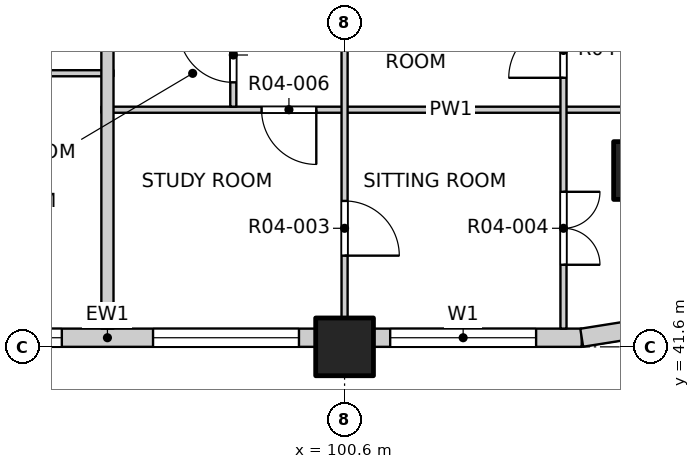
"""IFC4 building model, lengths in metres.
Left out: names, types, materials, properties, quantities, classifications, styles, units other than length and angle.
Written with IfcOpenShell. Run it as: python <this file> out.ifc"""

import sys

from ifc_helpers import new_model, si_unit, direction, frame, frame_2d, origin, origin_2d, place, context, subcontext, project, spatial, rectangle, extrude, element, fill, save


model = new_model("IFC4")
c1 = context("Model", 3, precision=1e-05, world=origin(), true_north=direction((0.0, 1.0)))
c2 = subcontext(c1, "Body", "Model", "MODEL_VIEW")
j1 = project(units=[si_unit("LENGTHUNIT", "METRE"), si_unit("PLANEANGLEUNIT", "RADIAN")], contexts=[c1])
p1 = place(None, origin())
s1 = spatial("IfcSite", under=j1, at=p1, CompositionType="ELEMENT")
p2 = place(p1, origin())
s2 = spatial("IfcBuilding", under=s1, at=p2, CompositionType="ELEMENT")
p3 = place(p2, frame((0.0, 0.0, 58.0)))
s3 = spatial("IfcBuildingStorey", under=s2, at=p3, CompositionType="ELEMENT", Elevation=58.0)
for number, where, z_axis, x_axis in (
    (1, (105.5, 44.5, -0.25), (0.0, 0.0, 1.0), (1.0, 0.0, 0.0)),
    (2, (100.6, 41.6, -0.25), (0.0, 0.0, 1.0), (1.0, 0.0, 0.0)),
):
    element("IfcColumn", number, at=place(p3, frame(where, z_axis=z_axis, x_axis=x_axis)), inside=s3, PredefinedType="COLUMN", context=c2, shape_type="SweptSolid", body=[
        extrude(rectangle(XDim=0.95, YDim=0.95, at=origin_2d()), origin(), (0.0, 0.0, 1.0), 3.4),
    ])
p4 = place(p3, frame((93.275, 41.75, 0.0), z_axis=(0.0, 0.0, 1.0), x_axis=(1.0, 0.0, 0.0)))
e3 = element("IfcWall", 3, at=p4, inside=s3, PredefinedType="SOLIDWALL", context=c2, shape_type="SweptSolid", body=[
    extrude(rectangle(XDim=6.85, YDim=0.3, at=frame_2d((3.425, 0.0))), origin(), (0.0, 0.0, 1.0), 2.7),
])
p5 = place(p4, frame((0.275, 0.0, 0.9)))
e4 = element("IfcOpeningElement", 4, at=p5, cuts=e3, PredefinedType="OPENING", context=c2, shape_type="SweptSolid", body=[
    extrude(rectangle(XDim=2.4, YDim=1.8, at=frame_2d((1.2, 0.9))), frame((0.0, 0.16, 0.0), z_axis=(0.0, -1.0, 0.0), x_axis=(1.0, 0.0, 0.0)), (0.0, 0.0, 1.0), 0.32),
])
p6 = place(p4, frame((4.175, 0.0, 0.9)))
e5 = element("IfcOpeningElement", 5, at=p6, cuts=e3, PredefinedType="OPENING", context=c2, shape_type="SweptSolid", body=[
    extrude(rectangle(XDim=2.4, YDim=1.8, at=frame_2d((1.2, 0.9))), frame((0.0, 0.16, 0.0), z_axis=(0.0, -1.0, 0.0), x_axis=(1.0, 0.0, 0.0)), (0.0, 0.0, 1.0), 0.32),
])
p7 = place(p3, frame((101.075, 41.75, 0.0), z_axis=(0.0, 0.0, 1.0), x_axis=(1.0, 0.0, 0.0)))
e6 = element("IfcWall", 6, at=p7, inside=s3, PredefinedType="SOLIDWALL", context=c2, shape_type="SweptSolid", body=[
    extrude(rectangle(XDim=3.425, YDim=0.3, at=frame_2d((1.712, 0.0))), origin(), (0.0, 0.0, 1.0), 2.7),
])
p8 = place(p7, frame((0.275, 0.0, 0.9)))
e7 = element("IfcOpeningElement", 7, at=p8, cuts=e6, PredefinedType="OPENING", context=c2, shape_type="SweptSolid", body=[
    extrude(rectangle(XDim=2.4, YDim=1.8, at=frame_2d((1.2, 0.9))), frame((0.0, 0.16, 0.0), z_axis=(0.0, -1.0, 0.0), x_axis=(1.0, 0.0, 0.0)), (0.0, 0.0, 1.0), 0.32),
])
p9 = place(p3, frame((104.5, 41.75, 0.0), z_axis=(0.0, 0.0, 1.0), x_axis=(0.987678452879, 0.156496880861, 0.0)))
e8 = element("IfcWall", 8, at=p9, inside=s3, PredefinedType="SOLIDWALL", context=c2, shape_type="SweptSolid", body=[
    extrude(rectangle(XDim=1.173, YDim=0.3, at=frame_2d((0.586, 0.0))), origin(), (0.0, 0.0, 1.0), 2.7),
])
p10 = place(p3, frame((96.6, 45.5, 0.0), z_axis=(0.0, 0.0, 1.0), x_axis=(1.0, 0.0, 0.0)))
e9 = element("IfcWall", 9, at=p10, inside=s3, PredefinedType="PARTITIONING", context=c2, shape_type="SweptSolid", body=[
    extrude(rectangle(XDim=11.5, YDim=0.1, at=frame_2d((5.75, 0.0))), origin(), (0.0, 0.0, 1.0), 3.15),
])
p11 = place(p10, frame((2.635, 0.0, 0.0)))
e10 = element("IfcOpeningElement", 10, at=p11, cuts=e9, PredefinedType="OPENING", context=c2, shape_type="SweptSolid", body=[
    extrude(rectangle(XDim=0.9, YDim=2.1, at=frame_2d((0.45, 1.05))), frame((0.0, 0.06, 0.0), z_axis=(0.0, -1.0, 0.0), x_axis=(1.0, 0.0, 0.0)), (0.0, 0.0, 1.0), 0.12),
])
p12 = place(p3, frame((81.0, 46.1, 0.0), z_axis=(0.0, 0.0, 1.0), x_axis=(1.0, 0.0, 0.0)))
e11 = element("IfcWall", 11, at=p12, inside=s3, PredefinedType="PARTITIONING", context=c2, shape_type="SweptSolid", body=[
    extrude(rectangle(XDim=15.8, YDim=0.1, at=frame_2d((7.9, 0.0))), origin(), (0.0, 0.0, 1.0), 3.15),
])
p13 = place(p12, frame((0.625, 0.0, 0.0)))
e12 = element("IfcOpeningElement", 12, at=p13, cuts=e11, PredefinedType="OPENING", context=c2, shape_type="SweptSolid", body=[
    extrude(rectangle(XDim=0.9, YDim=2.1, at=frame_2d((0.45, 1.05))), frame((0.0, 0.06, 0.0), z_axis=(0.0, -1.0, 0.0), x_axis=(1.0, 0.0, 0.0)), (0.0, 0.0, 1.0), 0.12),
])
p14 = place(p12, frame((2.575, 0.0, 0.0)))
e13 = element("IfcOpeningElement", 13, at=p14, cuts=e11, PredefinedType="OPENING", context=c2, shape_type="SweptSolid", body=[
    extrude(rectangle(XDim=0.9, YDim=2.1, at=frame_2d((0.45, 1.05))), frame((0.0, 0.06, 0.0), z_axis=(0.0, -1.0, 0.0), x_axis=(1.0, 0.0, 0.0)), (0.0, 0.0, 1.0), 0.12),
])
p15 = place(p12, frame((4.525, 0.0, 0.0)))
e14 = element("IfcOpeningElement", 14, at=p15, cuts=e11, PredefinedType="OPENING", context=c2, shape_type="SweptSolid", body=[
    extrude(rectangle(XDim=0.9, YDim=2.1, at=frame_2d((0.45, 1.05))), frame((0.0, 0.06, 0.0), z_axis=(0.0, -1.0, 0.0), x_axis=(1.0, 0.0, 0.0)), (0.0, 0.0, 1.0), 0.12),
])
p16 = place(p12, frame((6.475, 0.0, 0.0)))
e15 = element("IfcOpeningElement", 15, at=p16, cuts=e11, PredefinedType="OPENING", context=c2, shape_type="SweptSolid", body=[
    extrude(rectangle(XDim=0.9, YDim=2.1, at=frame_2d((0.45, 1.05))), frame((0.0, 0.06, 0.0), z_axis=(0.0, -1.0, 0.0), x_axis=(1.0, 0.0, 0.0)), (0.0, 0.0, 1.0), 0.12),
])
p17 = place(p12, frame((9.25, 0.0, 0.0)))
e16 = element("IfcOpeningElement", 16, at=p17, cuts=e11, PredefinedType="OPENING", context=c2, shape_type="SweptSolid", body=[
    extrude(rectangle(XDim=1.2, YDim=2.1, at=frame_2d((0.6, 1.05))), frame((0.0, 0.06, 0.0), z_axis=(0.0, -1.0, 0.0), x_axis=(1.0, 0.0, 0.0)), (0.0, 0.0, 1.0), 0.12),
])
p18 = place(p12, frame((13.15, 0.0, 0.0)))
e17 = element("IfcOpeningElement", 17, at=p18, cuts=e11, PredefinedType="OPENING", context=c2, shape_type="SweptSolid", body=[
    extrude(rectangle(XDim=1.2, YDim=2.1, at=frame_2d((0.6, 1.05))), frame((0.0, 0.06, 0.0), z_axis=(0.0, -1.0, 0.0), x_axis=(1.0, 0.0, 0.0)), (0.0, 0.0, 1.0), 0.12),
])
p19 = place(p3, frame((96.7, 41.9, 0.0), z_axis=(0.0, 0.0, 1.0), x_axis=(0.0, 1.0, 0.0)))
e18 = element("IfcWall", 18, at=p19, inside=s3, PredefinedType="PARTITIONING", context=c2, shape_type="SweptSolid", body=[
    extrude(rectangle(XDim=11.3, YDim=0.2, at=frame_2d((5.65, 0.0))), origin(), (0.0, 0.0, 1.0), 3.15),
])
p20 = place(p3, frame((98.77, 45.55, 0.0), z_axis=(0.0, 0.0, 1.0), x_axis=(0.0, 1.0, 0.0)))
e19 = element("IfcWall", 19, at=p20, inside=s3, PredefinedType="PARTITIONING", context=c2, shape_type="SweptSolid", body=[
    extrude(rectangle(XDim=10.05, YDim=0.1, at=frame_2d((5.025, 0.0))), origin(), (0.0, 0.0, 1.0), 3.15),
])
p21 = place(p20, frame((0.4, 0.0, 0.0)))
e20 = element("IfcOpeningElement", 20, at=p21, cuts=e19, PredefinedType="OPENING", context=c2, shape_type="SweptSolid", body=[
    extrude(rectangle(XDim=0.9, YDim=2.1, at=frame_2d((0.45, 1.05))), frame((0.0, 0.06, 0.0), z_axis=(0.0, -1.0, 0.0), x_axis=(1.0, 0.0, 0.0)), (0.0, 0.0, 1.0), 0.12),
])
p22 = place(p20, frame((2.8, 0.0, 0.0)))
e21 = element("IfcOpeningElement", 21, at=p22, cuts=e19, PredefinedType="OPENING", context=c2, shape_type="SweptSolid", body=[
    extrude(rectangle(XDim=0.8, YDim=2.1, at=frame_2d((0.4, 1.05))), frame((0.0, 0.06, 0.0), z_axis=(0.0, -1.0, 0.0), x_axis=(1.0, 0.0, 0.0)), (0.0, 0.0, 1.0), 0.12),
])
p23 = place(p20, frame((5.525, 0.0, 0.0)))
e22 = element("IfcOpeningElement", 22, at=p23, cuts=e19, PredefinedType="OPENING", context=c2, shape_type="SweptSolid", body=[
    extrude(rectangle(XDim=0.8, YDim=2.1, at=frame_2d((0.4, 1.05))), frame((0.0, 0.06, 0.0), z_axis=(0.0, -1.0, 0.0), x_axis=(1.0, 0.0, 0.0)), (0.0, 0.0, 1.0), 0.12),
])
p24 = place(p20, frame((8.25, 0.0, 0.0)))
e23 = element("IfcOpeningElement", 23, at=p24, cuts=e19, PredefinedType="OPENING", context=c2, shape_type="SweptSolid", body=[
    extrude(rectangle(XDim=0.8, YDim=2.1, at=frame_2d((0.4, 1.05))), frame((0.0, 0.06, 0.0), z_axis=(0.0, -1.0, 0.0), x_axis=(1.0, 0.0, 0.0)), (0.0, 0.0, 1.0), 0.12),
])
p25 = place(p3, frame((100.6, 41.9, 0.0), z_axis=(0.0, 0.0, 1.0), x_axis=(0.0, 1.0, 0.0)))
e24 = element("IfcWall", 24, at=p25, inside=s3, PredefinedType="PARTITIONING", context=c2, shape_type="SweptSolid", body=[
    extrude(rectangle(XDim=7.5, YDim=0.1, at=frame_2d((3.75, 0.0))), origin(), (0.0, 0.0, 1.0), 2.55),
])
p26 = place(p25, frame((1.2, 0.0, 0.0)))
e25 = element("IfcOpeningElement", 25, at=p26, cuts=e24, PredefinedType="OPENING", context=c2, shape_type="SweptSolid", body=[
    extrude(rectangle(XDim=0.9, YDim=2.1, at=frame_2d((0.45, 1.05))), frame((0.0, 0.06, 0.0), z_axis=(0.0, -1.0, 0.0), x_axis=(1.0, 0.0, 0.0)), (0.0, 0.0, 1.0), 0.12),
])
p27 = place(p25, frame((5.9, 0.0, 0.0)))
e26 = element("IfcOpeningElement", 26, at=p27, cuts=e24, PredefinedType="OPENING", context=c2, shape_type="SweptSolid", body=[
    extrude(rectangle(XDim=0.9, YDim=2.1, at=frame_2d((0.45, 1.05))), frame((0.0, 0.06, 0.0), z_axis=(0.0, -1.0, 0.0), x_axis=(1.0, 0.0, 0.0)), (0.0, 0.0, 1.0), 0.12),
])
p28 = place(p3, frame((104.2, 41.9, 0.0), z_axis=(0.0, 0.0, 1.0), x_axis=(0.0, 1.0, 0.0)))
e27 = element("IfcWall", 27, at=p28, inside=s3, PredefinedType="PARTITIONING", context=c2, shape_type="SweptSolid", body=[
    extrude(rectangle(XDim=46.2, YDim=0.1, at=frame_2d((23.1, 0.0))), origin(), (0.0, 0.0, 1.0), 3.15),
])
p29 = place(p28, frame((1.05, 0.0, 0.0)))
e28 = element("IfcOpeningElement", 28, at=p29, cuts=e27, PredefinedType="OPENING", context=c2, shape_type="SweptSolid", body=[
    extrude(rectangle(XDim=1.2, YDim=2.1, at=frame_2d((0.6, 1.05))), frame((0.0, 0.06, 0.0), z_axis=(0.0, -1.0, 0.0), x_axis=(1.0, 0.0, 0.0)), (0.0, 0.0, 1.0), 0.12),
])
p30 = place(p28, frame((4.125, 0.0, 0.0)))
e29 = element("IfcOpeningElement", 29, at=p30, cuts=e27, PredefinedType="OPENING", context=c2, shape_type="SweptSolid", body=[
    extrude(rectangle(XDim=0.9, YDim=2.1, at=frame_2d((0.45, 1.05))), frame((0.0, 0.06, 0.0), z_axis=(0.0, -1.0, 0.0), x_axis=(1.0, 0.0, 0.0)), (0.0, 0.0, 1.0), 0.12),
])
p31 = place(p28, frame((6.075, 0.0, 0.0)))
e30 = element("IfcOpeningElement", 30, at=p31, cuts=e27, PredefinedType="OPENING", context=c2, shape_type="SweptSolid", body=[
    extrude(rectangle(XDim=0.9, YDim=2.1, at=frame_2d((0.45, 1.05))), frame((0.0, 0.06, 0.0), z_axis=(0.0, -1.0, 0.0), x_axis=(1.0, 0.0, 0.0)), (0.0, 0.0, 1.0), 0.12),
])
p32 = place(p28, frame((8.025, 0.0, 0.0)))
e31 = element("IfcOpeningElement", 31, at=p32, cuts=e27, PredefinedType="OPENING", context=c2, shape_type="SweptSolid", body=[
    extrude(rectangle(XDim=0.9, YDim=2.1, at=frame_2d((0.45, 1.05))), frame((0.0, 0.06, 0.0), z_axis=(0.0, -1.0, 0.0), x_axis=(1.0, 0.0, 0.0)), (0.0, 0.0, 1.0), 0.12),
])
p33 = place(p28, frame((9.975, 0.0, 0.0)))
e32 = element("IfcOpeningElement", 32, at=p33, cuts=e27, PredefinedType="OPENING", context=c2, shape_type="SweptSolid", body=[
    extrude(rectangle(XDim=0.9, YDim=2.1, at=frame_2d((0.45, 1.05))), frame((0.0, 0.06, 0.0), z_axis=(0.0, -1.0, 0.0), x_axis=(1.0, 0.0, 0.0)), (0.0, 0.0, 1.0), 0.12),
])
p34 = place(p28, frame((12.75, 0.0, 0.0)))
e33 = element("IfcOpeningElement", 33, at=p34, cuts=e27, PredefinedType="OPENING", context=c2, shape_type="SweptSolid", body=[
    extrude(rectangle(XDim=1.2, YDim=2.1, at=frame_2d((0.6, 1.05))), frame((0.0, 0.06, 0.0), z_axis=(0.0, -1.0, 0.0), x_axis=(1.0, 0.0, 0.0)), (0.0, 0.0, 1.0), 0.12),
])
p35 = place(p28, frame((15.825, 0.0, 0.0)))
e34 = element("IfcOpeningElement", 34, at=p35, cuts=e27, PredefinedType="OPENING", context=c2, shape_type="SweptSolid", body=[
    extrude(rectangle(XDim=0.9, YDim=2.1, at=frame_2d((0.45, 1.05))), frame((0.0, 0.06, 0.0), z_axis=(0.0, -1.0, 0.0), x_axis=(1.0, 0.0, 0.0)), (0.0, 0.0, 1.0), 0.12),
])
p36 = place(p28, frame((17.775, 0.0, 0.0)))
e35 = element("IfcOpeningElement", 35, at=p36, cuts=e27, PredefinedType="OPENING", context=c2, shape_type="SweptSolid", body=[
    extrude(rectangle(XDim=0.9, YDim=2.1, at=frame_2d((0.45, 1.05))), frame((0.0, 0.06, 0.0), z_axis=(0.0, -1.0, 0.0), x_axis=(1.0, 0.0, 0.0)), (0.0, 0.0, 1.0), 0.12),
])
p37 = place(p28, frame((20.55, 0.0, 0.0)))
e36 = element("IfcOpeningElement", 36, at=p37, cuts=e27, PredefinedType="OPENING", context=c2, shape_type="SweptSolid", body=[
    extrude(rectangle(XDim=1.2, YDim=2.1, at=frame_2d((0.6, 1.05))), frame((0.0, 0.06, 0.0), z_axis=(0.0, -1.0, 0.0), x_axis=(1.0, 0.0, 0.0)), (0.0, 0.0, 1.0), 0.12),
])
p38 = place(p28, frame((24.45, 0.0, 0.0)))
e37 = element("IfcOpeningElement", 37, at=p38, cuts=e27, PredefinedType="OPENING", context=c2, shape_type="SweptSolid", body=[
    extrude(rectangle(XDim=1.2, YDim=2.1, at=frame_2d((0.6, 1.05))), frame((0.0, 0.06, 0.0), z_axis=(0.0, -1.0, 0.0), x_axis=(1.0, 0.0, 0.0)), (0.0, 0.0, 1.0), 0.12),
])
p39 = place(p28, frame((27.525, 0.0, 0.0)))
e38 = element("IfcOpeningElement", 38, at=p39, cuts=e27, PredefinedType="OPENING", context=c2, shape_type="SweptSolid", body=[
    extrude(rectangle(XDim=0.9, YDim=2.1, at=frame_2d((0.45, 1.05))), frame((0.0, 0.06, 0.0), z_axis=(0.0, -1.0, 0.0), x_axis=(1.0, 0.0, 0.0)), (0.0, 0.0, 1.0), 0.12),
])
p40 = place(p28, frame((29.475, 0.0, 0.0)))
e39 = element("IfcOpeningElement", 39, at=p40, cuts=e27, PredefinedType="OPENING", context=c2, shape_type="SweptSolid", body=[
    extrude(rectangle(XDim=0.9, YDim=2.1, at=frame_2d((0.45, 1.05))), frame((0.0, 0.06, 0.0), z_axis=(0.0, -1.0, 0.0), x_axis=(1.0, 0.0, 0.0)), (0.0, 0.0, 1.0), 0.12),
])
p41 = place(p28, frame((31.425, 0.0, 0.0)))
e40 = element("IfcOpeningElement", 40, at=p41, cuts=e27, PredefinedType="OPENING", context=c2, shape_type="SweptSolid", body=[
    extrude(rectangle(XDim=0.9, YDim=2.1, at=frame_2d((0.45, 1.05))), frame((0.0, 0.06, 0.0), z_axis=(0.0, -1.0, 0.0), x_axis=(1.0, 0.0, 0.0)), (0.0, 0.0, 1.0), 0.12),
])
p42 = place(p28, frame((33.375, 0.0, 0.0)))
e41 = element("IfcOpeningElement", 41, at=p42, cuts=e27, PredefinedType="OPENING", context=c2, shape_type="SweptSolid", body=[
    extrude(rectangle(XDim=0.9, YDim=2.1, at=frame_2d((0.45, 1.05))), frame((0.0, 0.06, 0.0), z_axis=(0.0, -1.0, 0.0), x_axis=(1.0, 0.0, 0.0)), (0.0, 0.0, 1.0), 0.12),
])
p43 = place(p28, frame((36.15, 0.0, 0.0)))
e42 = element("IfcOpeningElement", 42, at=p43, cuts=e27, PredefinedType="OPENING", context=c2, shape_type="SweptSolid", body=[
    extrude(rectangle(XDim=1.2, YDim=2.1, at=frame_2d((0.6, 1.05))), frame((0.0, 0.06, 0.0), z_axis=(0.0, -1.0, 0.0), x_axis=(1.0, 0.0, 0.0)), (0.0, 0.0, 1.0), 0.12),
])
p44 = place(p28, frame((39.225, 0.0, 0.0)))
e43 = element("IfcOpeningElement", 43, at=p44, cuts=e27, PredefinedType="OPENING", context=c2, shape_type="SweptSolid", body=[
    extrude(rectangle(XDim=0.9, YDim=2.1, at=frame_2d((0.45, 1.05))), frame((0.0, 0.06, 0.0), z_axis=(0.0, -1.0, 0.0), x_axis=(1.0, 0.0, 0.0)), (0.0, 0.0, 1.0), 0.12),
])
p45 = place(p28, frame((41.175, 0.0, 0.0)))
e44 = element("IfcOpeningElement", 44, at=p45, cuts=e27, PredefinedType="OPENING", context=c2, shape_type="SweptSolid", body=[
    extrude(rectangle(XDim=0.9, YDim=2.1, at=frame_2d((0.45, 1.05))), frame((0.0, 0.06, 0.0), z_axis=(0.0, -1.0, 0.0), x_axis=(1.0, 0.0, 0.0)), (0.0, 0.0, 1.0), 0.12),
])
p46 = place(p28, frame((43.95, 0.0, 0.0)))
e45 = element("IfcOpeningElement", 45, at=p46, cuts=e27, PredefinedType="OPENING", context=c2, shape_type="SweptSolid", body=[
    extrude(rectangle(XDim=1.2, YDim=2.1, at=frame_2d((0.6, 1.05))), frame((0.0, 0.06, 0.0), z_axis=(0.0, -1.0, 0.0), x_axis=(1.0, 0.0, 0.0)), (0.0, 0.0, 1.0), 0.12),
])
p47 = place(p5, origin())
e46 = element("IfcWindow", 46, at=p47, inside=s3, PartitioningType="DOUBLE_PANEL_VERTICAL", PredefinedType="WINDOW", context=c2, shape_type="SweptSolid", body=[
    extrude(rectangle(XDim=2.4, YDim=1.8, at=frame_2d((1.2, 0.9))), frame((0.0, 0.03, 0.0), z_axis=(0.0, -1.0, 0.0), x_axis=(1.0, 0.0, 0.0)), (0.0, 0.0, 1.0), 0.06),
])
fill(e4, e46)
p48 = place(p6, origin())
e47 = element("IfcWindow", 47, at=p48, inside=s3, PartitioningType="DOUBLE_PANEL_VERTICAL", PredefinedType="WINDOW", context=c2, shape_type="SweptSolid", body=[
    extrude(rectangle(XDim=2.4, YDim=1.8, at=frame_2d((1.2, 0.9))), frame((0.0, 0.03, 0.0), z_axis=(0.0, -1.0, 0.0), x_axis=(1.0, 0.0, 0.0)), (0.0, 0.0, 1.0), 0.06),
])
fill(e5, e47)
p49 = place(p8, origin())
e48 = element("IfcWindow", 48, at=p49, inside=s3, PartitioningType="DOUBLE_PANEL_VERTICAL", PredefinedType="WINDOW", context=c2, shape_type="SweptSolid", body=[
    extrude(rectangle(XDim=2.4, YDim=1.8, at=frame_2d((1.2, 0.9))), frame((0.0, 0.03, 0.0), z_axis=(0.0, -1.0, 0.0), x_axis=(1.0, 0.0, 0.0)), (0.0, 0.0, 1.0), 0.06),
])
fill(e7, e48)
p50 = place(p26, origin())
e49 = element("IfcDoor", 49, at=p50, inside=s3, OperationType="SINGLE_SWING_RIGHT", PredefinedType="DOOR", context=c2, shape_type="SweptSolid", body=[
    extrude(rectangle(XDim=0.9, YDim=2.1, at=frame_2d((0.45, 1.05))), frame((0.0, 0.025, 0.0), z_axis=(0.0, -1.0, 0.0), x_axis=(1.0, 0.0, 0.0)), (0.0, 0.0, 1.0), 0.05),
])
fill(e25, e49)
p51 = place(p29, origin())
e50 = element("IfcDoor", 50, at=p51, inside=s3, OperationType="DOUBLE_DOOR_SINGLE_SWING", PredefinedType="DOOR", context=c2, shape_type="SweptSolid", body=[
    extrude(rectangle(XDim=1.2, YDim=2.1, at=frame_2d((0.6, 1.05))), frame((0.0, 0.025, 0.0), z_axis=(0.0, -1.0, 0.0), x_axis=(1.0, 0.0, 0.0)), (0.0, 0.0, 1.0), 0.05),
])
fill(e28, e50)
p52 = place(p11, origin())
e51 = element("IfcDoor", 51, at=p52, inside=s3, OperationType="SINGLE_SWING_LEFT", PredefinedType="DOOR", context=c2, shape_type="SweptSolid", body=[
    extrude(rectangle(XDim=0.9, YDim=2.1, at=frame_2d((0.45, 1.05))), frame((0.0, 0.025, 0.0), z_axis=(0.0, -1.0, 0.0), x_axis=(1.0, 0.0, 0.0)), (0.0, 0.0, 1.0), 0.05),
])
fill(e10, e51)
p53 = place(p21, origin())
e52 = element("IfcDoor", 52, at=p53, inside=s3, OperationType="SINGLE_SWING_RIGHT", PredefinedType="DOOR", context=c2, shape_type="SweptSolid", body=[
    extrude(rectangle(XDim=0.9, YDim=2.1, at=frame_2d((0.45, 1.05))), frame((0.0, 0.025, 0.0), z_axis=(0.0, -1.0, 0.0), x_axis=(1.0, 0.0, 0.0)), (0.0, 0.0, 1.0), 0.05),
])
fill(e20, e52)
p54 = place(p30, origin())
e53 = element("IfcDoor", 53, at=p54, inside=s3, OperationType="SINGLE_SWING_LEFT", PredefinedType="DOOR", context=c2, shape_type="SweptSolid", body=[
    extrude(rectangle(XDim=0.9, YDim=2.1, at=frame_2d((0.45, 1.05))), frame((0.0, 0.025, 0.0), z_axis=(0.0, -1.0, 0.0), x_axis=(1.0, 0.0, 0.0)), (0.0, 0.0, 1.0), 0.05),
])
fill(e29, e53)
save(model, sys.argv[1])
